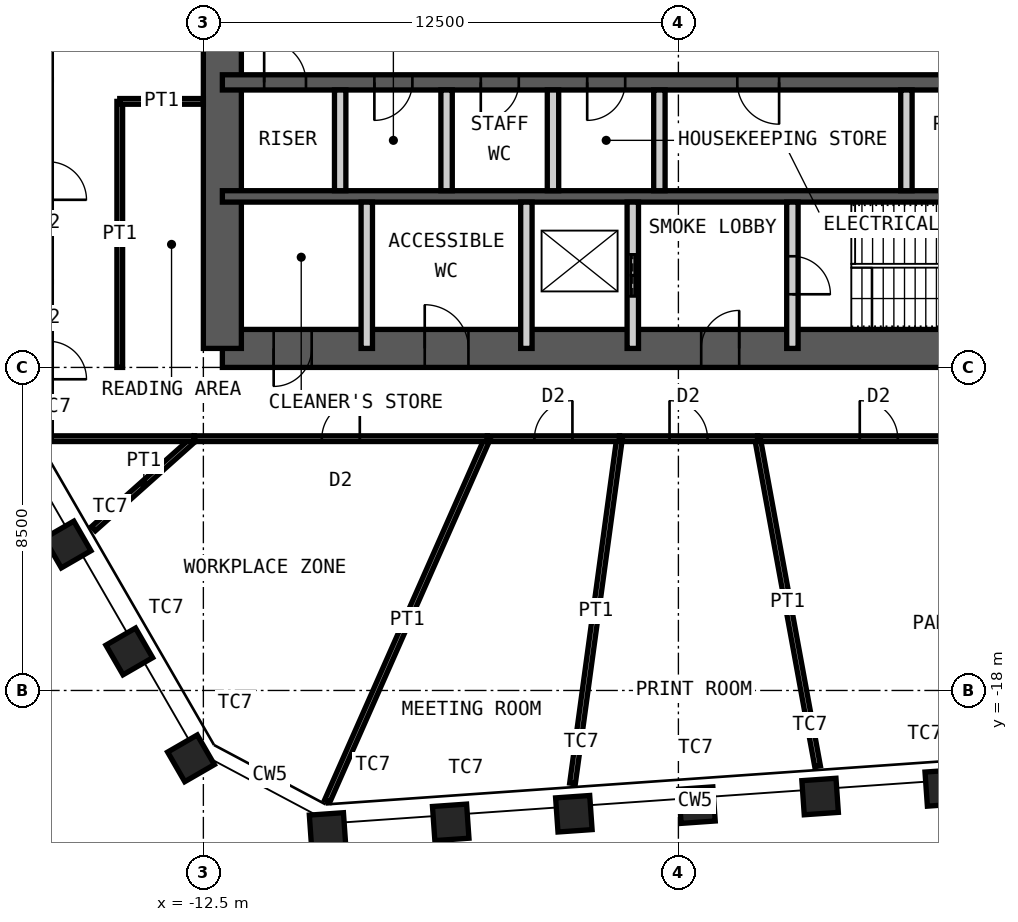
"""IFC4 building model, lengths in metres.
Left out: names, types, materials, properties, quantities, classifications, styles, units other than length and angle.
Written with IfcOpenShell. Run it as: python <this file> out.ifc"""

import sys

from ifc_helpers import new_model, si_unit, direction, frame, frame_2d, origin, origin_2d, place, context, subcontext, project, spatial, rectangle, hollow_rectangle, extrude, element, fill, save


model = new_model("IFC4")
c1 = context("Model", 3, precision=1e-05, world=origin(), true_north=direction((0.0, 1.0)))
c2 = subcontext(c1, "Body", "Model", "MODEL_VIEW")
j1 = project(units=[si_unit("LENGTHUNIT", "METRE"), si_unit("PLANEANGLEUNIT", "RADIAN")], contexts=[c1])
p1 = place(None, origin())
s1 = spatial("IfcSite", under=j1, at=p1, CompositionType="ELEMENT")
p2 = place(p1, origin())
s2 = spatial("IfcBuilding", under=s1, at=p2, CompositionType="ELEMENT")
p3 = place(p2, frame((0.0, 0.0, 283.0)))
s3 = spatial("IfcBuildingStorey", under=s2, at=p3, CompositionType="ELEMENT", Elevation=283.0)
for number, where, z_axis, x_axis in (
    (1, (6.969, -20.564, 0.0), (0.0, 0.0, 1.0), (0.998, 0.07, 0.0)),
    (2, (3.729, -20.791, 0.0), (0.0, 0.0, 1.0), (0.998, 0.07, 0.0)),
    (3, (0.489, -21.017, 0.0), (0.0, 0.0, 1.0), (0.998, 0.07, 0.0)),
    (4, (-2.751, -21.244, 0.0), (0.0, 0.0, 1.0), (0.998, 0.07, 0.0)),
    (5, (-5.991, -21.47, 0.0), (0.0, 0.0, 1.0), (0.998, 0.07, 0.0)),
    (6, (-9.231, -21.697, 0.0), (0.0, 0.0, 1.0), (0.998, 0.07, 0.0)),
    (7, (-12.825, -19.786, 0.0), (0.0, 0.0, 1.0), (0.5, -0.866, 0.0)),
    (8, (-14.449, -16.973, 0.0), (0.0, 0.0, 1.0), (0.5, -0.866, 0.0)),
    (9, (-16.073, -14.16, 0.0), (0.0, 0.0, 1.0), (0.5, -0.866, 0.0)),
):
    element("IfcColumn", number, at=place(p3, frame(where, z_axis=z_axis, x_axis=x_axis)), inside=s3, PredefinedType="COLUMN", context=c2, shape_type="SweptSolid", body=[
        extrude(hollow_rectangle(XDim=0.9, YDim=0.9, WallThickness=0.06, at=origin_2d()), origin(), (0.0, 0.0, 1.0), 4.2),
    ])
p4 = place(p3, frame((-12.0, -9.0, 0.0), z_axis=(0.0, 0.0, 1.0), x_axis=(1.0, 0.0, 0.0)))
e10 = element("IfcWall", 10, at=p4, inside=s3, PredefinedType="SHEAR", context=c2, shape_type="SweptSolid", body=[
    extrude(rectangle(XDim=24.0, YDim=1.0, at=frame_2d((12.0, 0.0))), origin(), (0.0, 0.0, 1.0), 4.2),
])
p5 = place(p4, frame((1.35, 0.0, 0.0)))
e11 = element("IfcOpeningElement", 11, at=p5, cuts=e10, PredefinedType="OPENING", context=c2, shape_type="SweptSolid", body=[
    extrude(rectangle(XDim=1.0, YDim=2.1, at=frame_2d((0.5, 1.05))), frame((0.0, 0.51, 0.0), z_axis=(0.0, -1.0, 0.0), x_axis=(1.0, 0.0, 0.0)), (0.0, 0.0, 1.0), 1.02),
])
p6 = place(p4, frame((5.325, 0.0, 0.0)))
e12 = element("IfcOpeningElement", 12, at=p6, cuts=e10, PredefinedType="OPENING", context=c2, shape_type="SweptSolid", body=[
    extrude(rectangle(XDim=1.15, YDim=2.1, at=frame_2d((0.575, 1.05))), frame((0.0, 0.51, 0.0), z_axis=(0.0, -1.0, 0.0), x_axis=(1.0, 0.0, 0.0)), (0.0, 0.0, 1.0), 1.02),
])
p7 = place(p4, frame((12.6, 0.0, 0.0)))
e13 = element("IfcOpeningElement", 13, at=p7, cuts=e10, PredefinedType="OPENING", context=c2, shape_type="SweptSolid", body=[
    extrude(rectangle(XDim=1.0, YDim=2.1, at=frame_2d((0.5, 1.05))), frame((0.0, 0.51, 0.0), z_axis=(0.0, -1.0, 0.0), x_axis=(1.0, 0.0, 0.0)), (0.0, 0.0, 1.0), 1.02),
])
p8 = place(p3, frame((-12.0, -9.0, 0.0), z_axis=(0.0, 0.0, 1.0), x_axis=(0.0, 1.0, 0.0)))
e14 = element("IfcWall", 14, at=p8, inside=s3, PredefinedType="SHEAR", context=c2, shape_type="SweptSolid", body=[
    extrude(rectangle(XDim=18.0, YDim=1.0, at=frame_2d((9.0, 0.0))), origin(), (0.0, 0.0, 1.0), 4.2),
])
p9 = place(p8, frame((8.1, 0.0, 0.0)))
e15 = element("IfcOpeningElement", 15, at=p9, cuts=e14, PredefinedType="OPENING", context=c2, shape_type="SweptSolid", body=[
    extrude(rectangle(XDim=1.8, YDim=2.1, at=frame_2d((0.9, 1.05))), frame((0.0, 0.51, 0.0), z_axis=(0.0, -1.0, 0.0), x_axis=(1.0, 0.0, 0.0)), (0.0, 0.0, 1.0), 1.02),
])
p10 = place(p3, frame((-12.0, -2.0, 0.0), z_axis=(0.0, 0.0, 1.0), x_axis=(1.0, 0.0, 0.0)))
e16 = element("IfcWall", 16, at=p10, inside=s3, PredefinedType="SHEAR", context=c2, shape_type="SweptSolid", body=[
    extrude(rectangle(XDim=24.0, YDim=0.4, at=frame_2d((12.0, 0.0))), origin(), (0.0, 0.0, 1.0), 4.2),
])
p11 = place(p10, frame((1.1, 0.0, 0.0)))
e17 = element("IfcOpeningElement", 17, at=p11, cuts=e16, PredefinedType="OPENING", context=c2, shape_type="SweptSolid", body=[
    extrude(rectangle(XDim=1.1, YDim=2.1, at=frame_2d((0.55, 1.05))), frame((0.0, 0.21, 0.0), z_axis=(0.0, -1.0, 0.0), x_axis=(1.0, 0.0, 0.0)), (0.0, 0.0, 1.0), 0.42),
])
p12 = place(p10, frame((13.55, 0.0, 0.0)))
e18 = element("IfcOpeningElement", 18, at=p12, cuts=e16, PredefinedType="OPENING", context=c2, shape_type="SweptSolid", body=[
    extrude(rectangle(XDim=1.1, YDim=2.1, at=frame_2d((0.55, 1.05))), frame((0.0, 0.21, 0.0), z_axis=(0.0, -1.0, 0.0), x_axis=(1.0, 0.0, 0.0)), (0.0, 0.0, 1.0), 0.42),
])
p13 = place(p10, frame((20.7, 0.0, 0.0)))
e19 = element("IfcOpeningElement", 19, at=p13, cuts=e16, PredefinedType="OPENING", context=c2, shape_type="SweptSolid", body=[
    extrude(rectangle(XDim=1.1, YDim=2.1, at=frame_2d((0.55, 1.05))), frame((0.0, 0.21, 0.0), z_axis=(0.0, -1.0, 0.0), x_axis=(1.0, 0.0, 0.0)), (0.0, 0.0, 1.0), 0.42),
])
p14 = place(p10, frame((4.0, 0.0, 0.0)))
e20 = element("IfcOpeningElement", 20, at=p14, cuts=e16, PredefinedType="OPENING", context=c2, shape_type="SweptSolid", body=[
    extrude(rectangle(XDim=1.0, YDim=2.1, at=frame_2d((0.5, 1.05))), frame((0.0, 0.21, 0.0), z_axis=(0.0, -1.0, 0.0), x_axis=(1.0, 0.0, 0.0)), (0.0, 0.0, 1.0), 0.42),
])
p15 = place(p10, frame((6.8, 0.0, 0.0)))
e21 = element("IfcOpeningElement", 21, at=p15, cuts=e16, PredefinedType="OPENING", context=c2, shape_type="SweptSolid", body=[
    extrude(rectangle(XDim=1.0, YDim=2.1, at=frame_2d((0.5, 1.05))), frame((0.0, 0.21, 0.0), z_axis=(0.0, -1.0, 0.0), x_axis=(1.0, 0.0, 0.0)), (0.0, 0.0, 1.0), 0.42),
])
p16 = place(p10, frame((9.6, 0.0, 0.0)))
e22 = element("IfcOpeningElement", 22, at=p16, cuts=e16, PredefinedType="OPENING", context=c2, shape_type="SweptSolid", body=[
    extrude(rectangle(XDim=1.0, YDim=2.1, at=frame_2d((0.5, 1.05))), frame((0.0, 0.21, 0.0), z_axis=(0.0, -1.0, 0.0), x_axis=(1.0, 0.0, 0.0)), (0.0, 0.0, 1.0), 0.42),
])
p17 = place(p3, frame((-12.0, -5.0, 0.0), z_axis=(0.0, 0.0, 1.0), x_axis=(1.0, 0.0, 0.0)))
e23 = element("IfcWall", 23, at=p17, inside=s3, PredefinedType="SHEAR", context=c2, shape_type="SweptSolid", body=[
    extrude(rectangle(XDim=24.0, YDim=0.3, at=frame_2d((12.0, 0.0))), origin(), (0.0, 0.0, 1.0), 4.2),
])
for number, where, z_axis, x_axis in (
    (24, (-8.9, -4.85, 0.0), (0.0, 0.0, 1.0), (0.0, 1.0, 0.0)),
    (25, (-6.1, -4.85, 0.0), (0.0, 0.0, 1.0), (0.0, 1.0, 0.0)),
    (26, (-3.3, -4.85, 0.0), (0.0, 0.0, 1.0), (0.0, 1.0, 0.0)),
    (27, (-0.5, -4.85, 0.0), (0.0, 0.0, 1.0), (0.0, 1.0, 0.0)),
    (28, (6.0, -4.85, 0.0), (0.0, 0.0, 1.0), (0.0, 1.0, 0.0)),
):
    element("IfcWall", number, at=place(p3, frame(where, z_axis=z_axis, x_axis=x_axis)), inside=s3, PredefinedType="PARTITIONING", context=c2, shape_type="SweptSolid", body=[
        extrude(rectangle(XDim=2.65, YDim=0.3, at=frame_2d((1.325, 0.0))), origin(), (0.0, 0.0, 1.0), 3.98),
    ])
for number, where, z_axis, x_axis in (
    (29, (-8.2, -9.0, 0.0), (0.0, 0.0, 1.0), (0.0, 1.0, 0.0)),
    (30, (-4.0, -9.0, 0.0), (0.0, 0.0, 1.0), (0.0, 1.0, 0.0)),
):
    element("IfcWall", number, at=place(p3, frame(where, z_axis=z_axis, x_axis=x_axis)), inside=s3, PredefinedType="PARTITIONING", context=c2, shape_type="SweptSolid", body=[
        extrude(rectangle(XDim=3.85, YDim=0.3, at=frame_2d((1.925, 0.0))), origin(), (0.0, 0.0, 1.0), 3.98),
    ])
p18 = place(p3, frame((-1.2, -9.0, 0.0), z_axis=(0.0, 0.0, 1.0), x_axis=(0.0, 1.0, 0.0)))
e31 = element("IfcWall", 31, at=p18, inside=s3, PredefinedType="PARTITIONING", context=c2, shape_type="SweptSolid", body=[
    extrude(rectangle(XDim=3.85, YDim=0.3, at=frame_2d((1.925, 0.0))), origin(), (0.0, 0.0, 1.0), 3.98),
])
p19 = place(p18, frame((1.375, 0.0, 0.0)))
e32 = element("IfcOpeningElement", 32, at=p19, cuts=e31, PredefinedType="OPENING", context=c2, shape_type="SweptSolid", body=[
    extrude(rectangle(XDim=1.1, YDim=2.4, at=frame_2d((0.55, 1.2))), frame((0.0, 0.16, 0.0), z_axis=(0.0, -1.0, 0.0), x_axis=(1.0, 0.0, 0.0)), (0.0, 0.0, 1.0), 0.32),
])
p20 = place(p3, frame((3.0, -9.0, 0.0), z_axis=(0.0, 0.0, 1.0), x_axis=(0.0, 1.0, 0.0)))
e33 = element("IfcWall", 33, at=p20, inside=s3, PredefinedType="PARTITIONING", context=c2, shape_type="SweptSolid", body=[
    extrude(rectangle(XDim=3.85, YDim=0.3, at=frame_2d((1.925, 0.0))), origin(), (0.0, 0.0, 1.0), 3.98),
])
p21 = place(p20, frame((1.425, 0.0, 0.0)))
e34 = element("IfcOpeningElement", 34, at=p21, cuts=e33, PredefinedType="OPENING", context=c2, shape_type="SweptSolid", body=[
    extrude(rectangle(XDim=1.0, YDim=2.1, at=frame_2d((0.5, 1.05))), frame((0.0, 0.16, 0.0), z_axis=(0.0, -1.0, 0.0), x_axis=(1.0, 0.0, 0.0)), (0.0, 0.0, 1.0), 0.32),
])
p22 = place(p3, frame((8.461, -11.375, 0.0), z_axis=(0.0, 0.0, 1.0), x_axis=(-1.0, 0.0, 0.0)))
e35 = element("IfcWall", 35, at=p22, inside=s3, PredefinedType="PARTITIONING", context=c2, shape_type="SweptSolid", body=[
    extrude(rectangle(XDim=6.378, YDim=0.15, at=frame_2d((3.189, 0.0))), origin(), (0.0, 0.0, 1.0), 4.03),
])
p23 = place(p22, frame((2.689, 0.0, 0.0)))
e36 = element("IfcOpeningElement", 36, at=p23, cuts=e35, PredefinedType="OPENING", context=c2, shape_type="SweptSolid", body=[
    extrude(rectangle(XDim=1.0, YDim=2.4, at=frame_2d((0.5, 1.2))), frame((0.0, 0.085, 0.0), z_axis=(0.0, -1.0, 0.0), x_axis=(1.0, 0.0, 0.0)), (0.0, 0.0, 1.0), 0.17),
])
p24 = place(p3, frame((3.662, -19.994, 0.0), z_axis=(0.0, 0.0, 1.0), x_axis=(-0.18018724377, 0.983632328252, 0.0)))
e37 = element("IfcWall", 37, at=p24, inside=s3, PredefinedType="PARTITIONING", context=c2, shape_type="SweptSolid", body=[
    extrude(rectangle(XDim=8.762, YDim=0.15, at=frame_2d((4.381, 0.0))), origin(), (0.0, 0.0, 1.0), 3.33),
])
p25 = place(p3, frame((2.083, -11.375, 0.0), z_axis=(0.0, 0.0, 1.0), x_axis=(-1.0, 0.0, 0.0)))
e38 = element("IfcWall", 38, at=p25, inside=s3, PredefinedType="PARTITIONING", context=c2, shape_type="SweptSolid", body=[
    extrude(rectangle(XDim=3.634, YDim=0.15, at=frame_2d((1.817, 0.0))), origin(), (0.0, 0.0, 1.0), 4.03),
])
p26 = place(p25, frame((1.317, 0.0, 0.0)))
e39 = element("IfcOpeningElement", 39, at=p26, cuts=e38, PredefinedType="OPENING", context=c2, shape_type="SweptSolid", body=[
    extrude(rectangle(XDim=1.0, YDim=2.4, at=frame_2d((0.5, 1.2))), frame((0.0, 0.085, 0.0), z_axis=(0.0, -1.0, 0.0), x_axis=(1.0, 0.0, 0.0)), (0.0, 0.0, 1.0), 0.17),
])
p27 = place(p3, frame((-2.786, -20.446, 0.0), z_axis=(0.0, 0.0, 1.0), x_axis=(0.135041803834, 0.99083990191, 0.0)))
e40 = element("IfcWall", 40, at=p27, inside=s3, PredefinedType="PARTITIONING", context=c2, shape_type="SweptSolid", body=[
    extrude(rectangle(XDim=9.155, YDim=0.15, at=frame_2d((4.578, 0.0))), origin(), (0.0, 0.0, 1.0), 3.33),
])
p28 = place(p3, frame((-1.55, -11.375, 0.0), z_axis=(0.0, 0.0, 1.0), x_axis=(-1.0, 0.0, 0.0)))
e41 = element("IfcWall", 41, at=p28, inside=s3, PredefinedType="PARTITIONING", context=c2, shape_type="SweptSolid", body=[
    extrude(rectangle(XDim=3.477, YDim=0.15, at=frame_2d((1.739, 0.0))), origin(), (0.0, 0.0, 1.0), 4.03),
])
p29 = place(p28, frame((1.239, 0.0, 0.0)))
e42 = element("IfcOpeningElement", 42, at=p29, cuts=e41, PredefinedType="OPENING", context=c2, shape_type="SweptSolid", body=[
    extrude(rectangle(XDim=1.0, YDim=2.4, at=frame_2d((0.5, 1.2))), frame((0.0, 0.085, 0.0), z_axis=(0.0, -1.0, 0.0), x_axis=(1.0, 0.0, 0.0)), (0.0, 0.0, 1.0), 0.17),
])
p30 = place(p3, frame((-9.24, -20.907, 0.0), z_axis=(0.0, 0.0, 1.0), x_axis=(0.404231308238, 0.914656793251, 0.0)))
e43 = element("IfcWall", 43, at=p30, inside=s3, PredefinedType="PARTITIONING", context=c2, shape_type="SweptSolid", body=[
    extrude(rectangle(XDim=10.421, YDim=0.15, at=frame_2d((5.211, 0.0))), origin(), (0.0, 0.0, 1.0), 2.93),
])
p31 = place(p3, frame((-5.027, -11.375, 0.0), z_axis=(0.0, 0.0, 1.0), x_axis=(-1.0, 0.0, 0.0)))
e44 = element("IfcWall", 44, at=p31, inside=s3, PredefinedType="PARTITIONING", context=c2, shape_type="SweptSolid", body=[
    extrude(rectangle(XDim=7.713, YDim=0.15, at=frame_2d((3.856, 0.0))), origin(), (0.0, 0.0, 1.0), 4.03),
])
p32 = place(p31, frame((3.356, 0.0, 0.0)))
e45 = element("IfcOpeningElement", 45, at=p32, cuts=e44, PredefinedType="OPENING", context=c2, shape_type="SweptSolid", body=[
    extrude(rectangle(XDim=1.0, YDim=2.4, at=frame_2d((0.5, 1.2))), frame((0.0, 0.085, 0.0), z_axis=(0.0, -1.0, 0.0), x_axis=(1.0, 0.0, 0.0)), (0.0, 0.0, 1.0), 0.17),
])
p33 = place(p3, frame((-15.393, -13.743, 0.0), z_axis=(0.0, 0.0, 1.0), x_axis=(0.745934007174, 0.666019862273, 0.0)))
e46 = element("IfcWall", 46, at=p33, inside=s3, PredefinedType="PARTITIONING", context=c2, shape_type="SweptSolid", body=[
    extrude(rectangle(XDim=3.556, YDim=0.15, at=frame_2d((1.778, 0.0))), origin(), (0.0, 0.0, 1.0), 3.33),
])
p34 = place(p3, frame((-12.74, -11.375, 0.0), z_axis=(0.0, 0.0, 1.0), x_axis=(-1.0, 0.0, 0.0)))
e47 = element("IfcWall", 47, at=p34, inside=s3, PredefinedType="PARTITIONING", context=c2, shape_type="SweptSolid", body=[
    extrude(rectangle(XDim=3.835, YDim=0.15, at=frame_2d((1.917, 0.0))), origin(), (0.0, 0.0, 1.0), 4.03),
])
p35 = place(p3, frame((-14.7, -9.5, 0.0), z_axis=(0.0, 0.0, 1.0), x_axis=(0.0, 1.0, 0.0)))
e48 = element("IfcWall", 48, at=p35, inside=s3, PredefinedType="PARTITIONING", context=c2, shape_type="SweptSolid", body=[
    extrude(rectangle(XDim=7.0, YDim=0.15, at=frame_2d((3.5, 0.0))), origin(), (0.0, 0.0, 1.0), 4.03),
])
p36 = place(p3, frame((-12.5, -2.5, 0.0), z_axis=(0.0, 0.0, 1.0), x_axis=(-1.0, 0.0, 0.0)))
e49 = element("IfcWall", 49, at=p36, inside=s3, PredefinedType="PARTITIONING", context=c2, shape_type="SweptSolid", body=[
    extrude(rectangle(XDim=2.2, YDim=0.15, at=frame_2d((1.1, 0.0))), origin(), (0.0, 0.0, 1.0), 3.53),
])
p37 = place(p5, origin())
e50 = element("IfcDoor", 50, at=p37, inside=s3, OperationType="SINGLE_SWING_LEFT", PredefinedType="DOOR", context=c2, shape_type="SweptSolid", body=[
    extrude(rectangle(XDim=1.0, YDim=2.1, at=frame_2d((0.5, 1.05))), frame((0.0, 0.025, 0.0), z_axis=(0.0, -1.0, 0.0), x_axis=(1.0, 0.0, 0.0)), (0.0, 0.0, 1.0), 0.05),
])
fill(e11, e50)
p38 = place(p6, origin())
e51 = element("IfcDoor", 51, at=p38, inside=s3, OperationType="SINGLE_SWING_RIGHT", PredefinedType="DOOR", context=c2, shape_type="SweptSolid", body=[
    extrude(rectangle(XDim=1.15, YDim=2.1, at=frame_2d((0.575, 1.05))), frame((0.0, 0.025, 0.0), z_axis=(0.0, -1.0, 0.0), x_axis=(1.0, 0.0, 0.0)), (0.0, 0.0, 1.0), 0.05),
])
fill(e12, e51)
p39 = place(p7, origin())
e52 = element("IfcDoor", 52, at=p39, inside=s3, OperationType="SINGLE_SWING_LEFT", PredefinedType="DOOR", context=c2, shape_type="SweptSolid", body=[
    extrude(rectangle(XDim=1.0, YDim=2.1, at=frame_2d((0.5, 1.05))), frame((0.0, 0.025, 0.0), z_axis=(0.0, -1.0, 0.0), x_axis=(1.0, 0.0, 0.0)), (0.0, 0.0, 1.0), 0.05),
])
fill(e13, e52)
p40 = place(p21, origin())
e53 = element("IfcDoor", 53, at=p40, inside=s3, OperationType="SINGLE_SWING_LEFT", PredefinedType="DOOR", context=c2, shape_type="SweptSolid", body=[
    extrude(rectangle(XDim=1.0, YDim=2.1, at=frame_2d((0.5, 1.05))), frame((0.0, 0.025, 0.0), z_axis=(0.0, -1.0, 0.0), x_axis=(1.0, 0.0, 0.0)), (0.0, 0.0, 1.0), 0.05),
])
fill(e34, e53)
p41 = place(p11, origin())
e54 = element("IfcDoor", 54, at=p41, inside=s3, OperationType="SINGLE_SWING_RIGHT", PredefinedType="DOOR", context=c2, shape_type="SweptSolid", body=[
    extrude(rectangle(XDim=1.1, YDim=2.1, at=frame_2d((0.55, 1.05))), frame((0.0, 0.025, 0.0), z_axis=(0.0, -1.0, 0.0), x_axis=(1.0, 0.0, 0.0)), (0.0, 0.0, 1.0), 0.05),
])
fill(e17, e54)
p42 = place(p12, origin())
e55 = element("IfcDoor", 55, at=p42, inside=s3, OperationType="SINGLE_SWING_RIGHT", PredefinedType="DOOR", context=c2, shape_type="SweptSolid", body=[
    extrude(rectangle(XDim=1.1, YDim=2.1, at=frame_2d((0.55, 1.05))), frame((0.0, 0.025, 0.0), z_axis=(0.0, -1.0, 0.0), x_axis=(1.0, 0.0, 0.0)), (0.0, 0.0, 1.0), 0.05),
])
fill(e18, e55)
p43 = place(p19, origin())
e56 = element("IfcDoor", 56, at=p43, inside=s3, OperationType="DOUBLE_DOOR_SLIDING", PredefinedType="DOOR", context=c2, shape_type="SweptSolid", body=[
    extrude(rectangle(XDim=1.1, YDim=2.4, at=frame_2d((0.55, 1.2))), frame((0.0, 0.025, 0.0), z_axis=(0.0, -1.0, 0.0), x_axis=(1.0, 0.0, 0.0)), (0.0, 0.0, 1.0), 0.05),
])
fill(e32, e56)
p44 = place(p14, origin())
e57 = element("IfcDoor", 57, at=p44, inside=s3, OperationType="SINGLE_SWING_LEFT", PredefinedType="DOOR", context=c2, shape_type="SweptSolid", body=[
    extrude(rectangle(XDim=1.0, YDim=2.1, at=frame_2d((0.5, 1.05))), frame((0.0, 0.025, 0.0), z_axis=(0.0, -1.0, 0.0), x_axis=(1.0, 0.0, 0.0)), (0.0, 0.0, 1.0), 0.05),
])
fill(e20, e57)
p45 = place(p15, origin())
e58 = element("IfcDoor", 58, at=p45, inside=s3, OperationType="SINGLE_SWING_LEFT", PredefinedType="DOOR", context=c2, shape_type="SweptSolid", body=[
    extrude(rectangle(XDim=1.0, YDim=2.1, at=frame_2d((0.5, 1.05))), frame((0.0, 0.025, 0.0), z_axis=(0.0, -1.0, 0.0), x_axis=(1.0, 0.0, 0.0)), (0.0, 0.0, 1.0), 0.05),
])
fill(e21, e58)
p46 = place(p16, origin())
e59 = element("IfcDoor", 59, at=p46, inside=s3, OperationType="SINGLE_SWING_LEFT", PredefinedType="DOOR", context=c2, shape_type="SweptSolid", body=[
    extrude(rectangle(XDim=1.0, YDim=2.1, at=frame_2d((0.5, 1.05))), frame((0.0, 0.025, 0.0), z_axis=(0.0, -1.0, 0.0), x_axis=(1.0, 0.0, 0.0)), (0.0, 0.0, 1.0), 0.05),
])
fill(e22, e59)
p47 = place(p23, origin())
e60 = element("IfcDoor", 60, at=p47, inside=s3, OperationType="SINGLE_SWING_RIGHT", PredefinedType="DOOR", context=c2, shape_type="SweptSolid", body=[
    extrude(rectangle(XDim=1.0, YDim=2.4, at=frame_2d((0.5, 1.2))), frame((0.0, 0.025, 0.0), z_axis=(0.0, -1.0, 0.0), x_axis=(1.0, 0.0, 0.0)), (0.0, 0.0, 1.0), 0.05),
])
fill(e36, e60)
p48 = place(p26, origin())
e61 = element("IfcDoor", 61, at=p48, inside=s3, OperationType="SINGLE_SWING_RIGHT", PredefinedType="DOOR", context=c2, shape_type="SweptSolid", body=[
    extrude(rectangle(XDim=1.0, YDim=2.4, at=frame_2d((0.5, 1.2))), frame((0.0, 0.025, 0.0), z_axis=(0.0, -1.0, 0.0), x_axis=(1.0, 0.0, 0.0)), (0.0, 0.0, 1.0), 0.05),
])
fill(e39, e61)
p49 = place(p29, origin())
e62 = element("IfcDoor", 62, at=p49, inside=s3, OperationType="SINGLE_SWING_LEFT", PredefinedType="DOOR", context=c2, shape_type="SweptSolid", body=[
    extrude(rectangle(XDim=1.0, YDim=2.4, at=frame_2d((0.5, 1.2))), frame((0.0, 0.025, 0.0), z_axis=(0.0, -1.0, 0.0), x_axis=(1.0, 0.0, 0.0)), (0.0, 0.0, 1.0), 0.05),
])
fill(e42, e62)
p50 = place(p32, origin())
e63 = element("IfcDoor", 63, at=p50, inside=s3, OperationType="SINGLE_SWING_LEFT", PredefinedType="DOOR", context=c2, shape_type="SweptSolid", body=[
    extrude(rectangle(XDim=1.0, YDim=2.4, at=frame_2d((0.5, 1.2))), frame((0.0, 0.025, 0.0), z_axis=(0.0, -1.0, 0.0), x_axis=(1.0, 0.0, 0.0)), (0.0, 0.0, 1.0), 0.05),
])
fill(e45, e63)
save(model, sys.argv[1])
